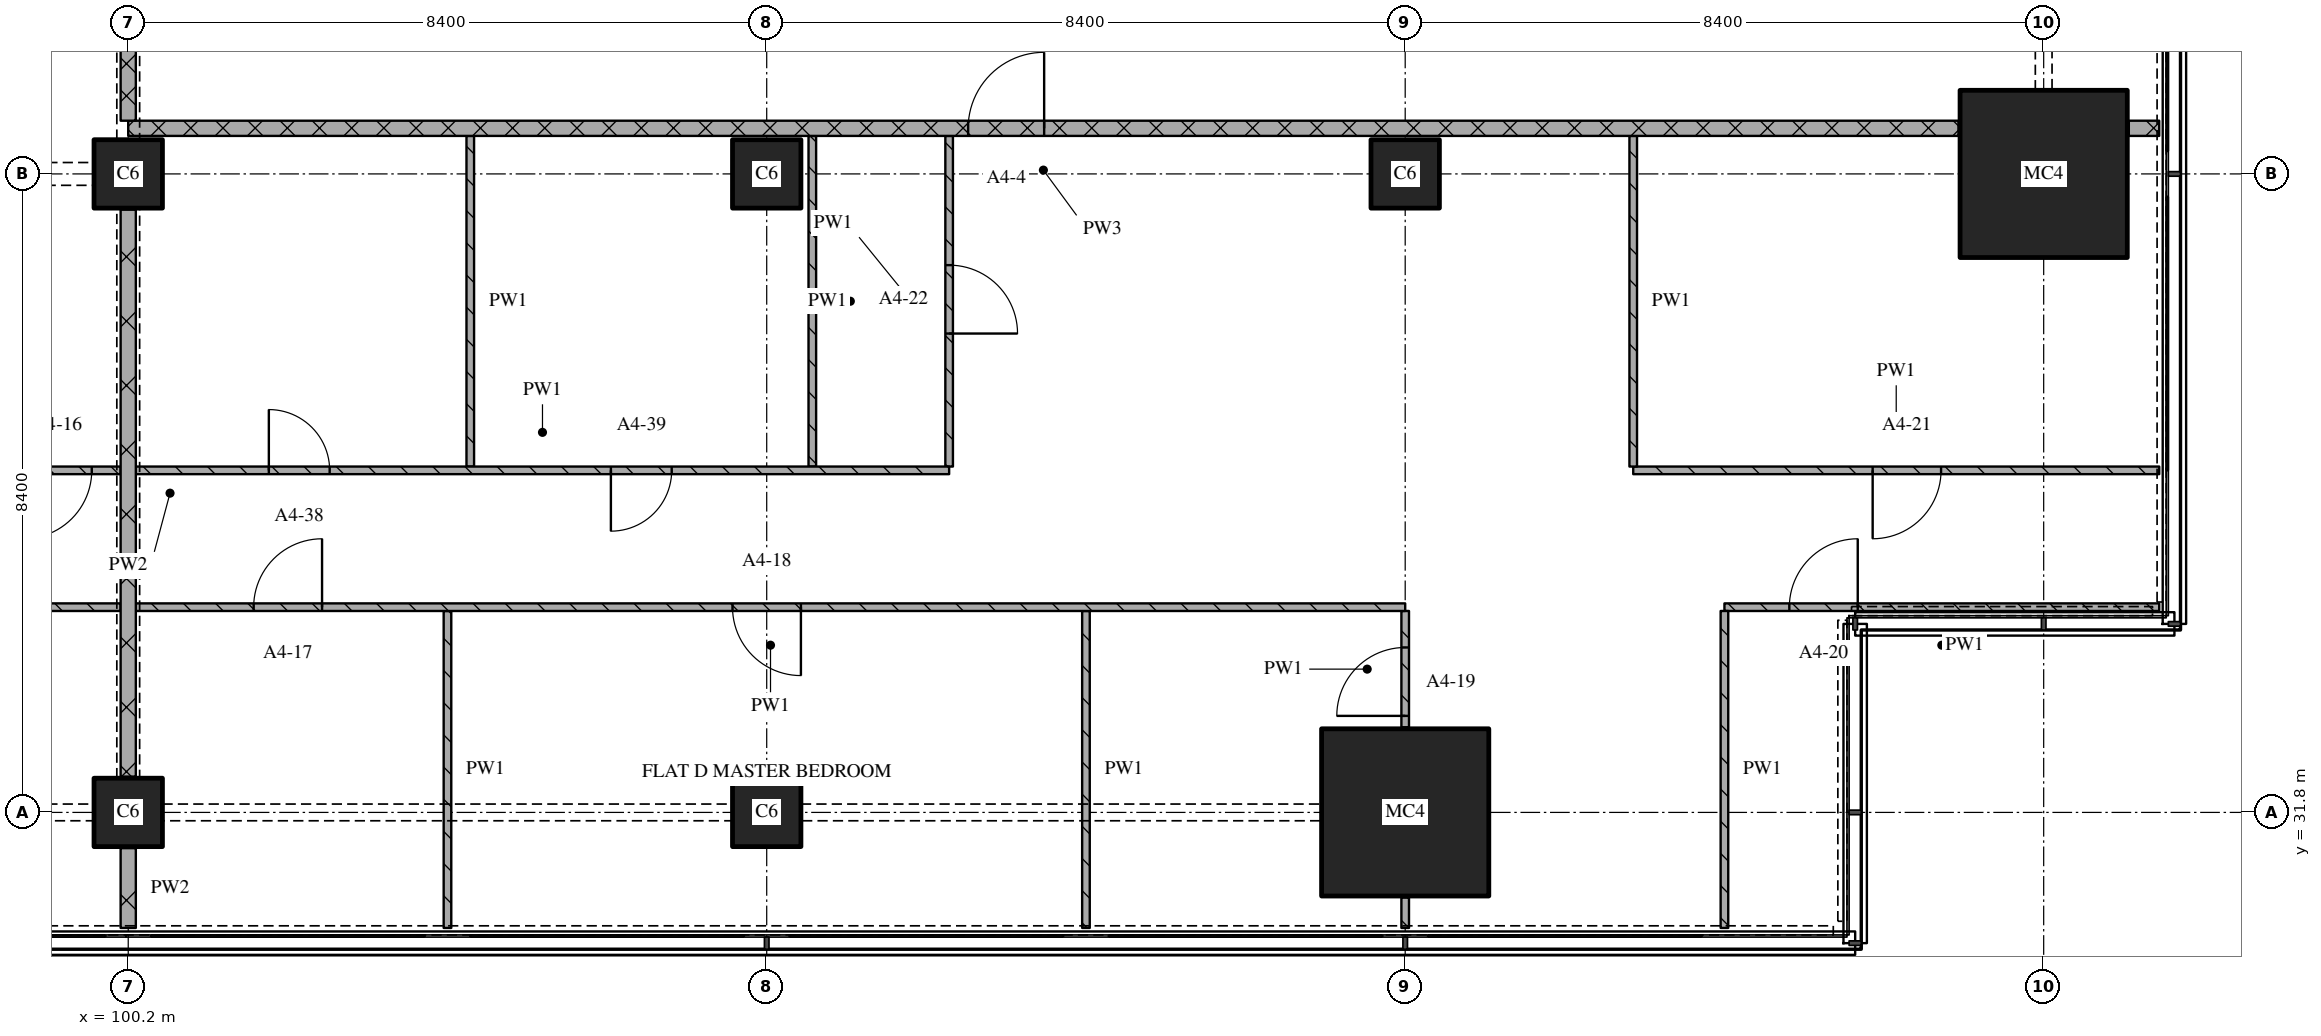
"""IFC4 building model, lengths in metres.
Left out: names, types, materials, properties, quantities, classifications, styles, units other than length and angle.
Written with IfcOpenShell. Run it as: python <this file> out.ifc"""

import sys

from ifc_helpers import new_model, si_unit, direction, frame, frame_2d, origin, origin_2d, place, context, subcontext, project, spatial, rectangle, extrude, element, fill, save


model = new_model("IFC4")
c1 = context("Model", 3, precision=1e-05, world=origin(), true_north=direction((0.0, 1.0)))
c2 = subcontext(c1, "Body", "Model", "MODEL_VIEW")
j1 = project(units=[si_unit("LENGTHUNIT", "METRE"), si_unit("PLANEANGLEUNIT", "RADIAN")], contexts=[c1])
p1 = place(None, origin())
s1 = spatial("IfcSite", under=j1, at=p1, CompositionType="ELEMENT")
p2 = place(p1, origin())
s2 = spatial("IfcBuilding", under=s1, at=p2, CompositionType="ELEMENT")
p3 = place(p2, frame((0.0, 0.0, 76.8)))
s3 = spatial("IfcBuildingStorey", under=s2, at=p3, CompositionType="ELEMENT", Elevation=76.8)
for number, where, z_axis, x_axis in (
    (1, (100.2, 31.8, 0.0), (0.0, 0.0, 1.0), (1.0, 0.0, 0.0)),
    (2, (100.2, 40.2, 0.0), (0.0, 0.0, 1.0), (1.0, 0.0, 0.0)),
    (3, (108.6, 31.8, 0.0), (0.0, 0.0, 1.0), (1.0, 0.0, 0.0)),
    (4, (108.6, 40.2, 0.0), (0.0, 0.0, 1.0), (1.0, 0.0, 0.0)),
):
    element("IfcColumn", number, at=place(p3, frame(where, z_axis=z_axis, x_axis=x_axis)), inside=s3, PredefinedType="COLUMN", context=c2, shape_type="SweptSolid", body=[
        extrude(rectangle(XDim=0.9, YDim=0.9, at=origin_2d()), origin(), (0.0, 0.0, 1.0), 3.6),
    ])
p4 = place(p3, frame((117.0, 31.8, 0.0), z_axis=(0.0, 0.0, 1.0), x_axis=(1.0, 0.0, 0.0)))
e5 = element("IfcColumn", 5, at=p4, inside=s3, PredefinedType="COLUMN", context=c2, shape_type="SweptSolid", body=[
    extrude(rectangle(XDim=2.2, YDim=2.2, at=origin_2d()), origin(), (0.0, 0.0, 1.0), 3.6),
])
p5 = place(p3, frame((117.0, 40.2, 0.0), z_axis=(0.0, 0.0, 1.0), x_axis=(1.0, 0.0, 0.0)))
e6 = element("IfcColumn", 6, at=p5, inside=s3, PredefinedType="COLUMN", context=c2, shape_type="SweptSolid", body=[
    extrude(rectangle(XDim=0.9, YDim=0.9, at=origin_2d()), origin(), (0.0, 0.0, 1.0), 3.6),
])
p6 = place(p3, frame((125.4, 40.2, 0.0), z_axis=(0.0, 0.0, 1.0), x_axis=(1.0, 0.0, 0.0)))
e7 = element("IfcColumn", 7, at=p6, inside=s3, PredefinedType="COLUMN", context=c2, shape_type="SweptSolid", body=[
    extrude(rectangle(XDim=2.2, YDim=2.2, at=origin_2d()), origin(), (0.0, 0.0, 1.0), 3.6),
])
p7 = place(p3, frame((126.92, 34.5, 0.0), z_axis=(0.0, 0.0, 1.0), x_axis=(-1.0, 0.0, 0.0)))
e8 = element("IfcWall", 8, at=p7, inside=s3, PredefinedType="PARTITIONING", context=c2, shape_type="SweptSolid", body=[
    extrude(rectangle(XDim=5.72, YDim=0.1, at=frame_2d((2.86, 0.0))), origin(), (0.0, 0.0, 1.0), 3.32),
])
p8 = place(p7, frame((3.966, 0.0, 0.0)))
e9 = element("IfcOpeningElement", 9, at=p8, cuts=e8, PredefinedType="OPENING", context=c2, shape_type="SweptSolid", body=[
    extrude(rectangle(XDim=0.9, YDim=2.1, at=frame_2d((0.45, 1.05))), frame((0.0, 0.06, 0.0), z_axis=(0.0, -1.0, 0.0), x_axis=(1.0, 0.0, 0.0)), (0.0, 0.0, 1.0), 0.12),
])
p9 = place(p3, frame((120.0, 36.3, 0.0), z_axis=(0.0, 0.0, 1.0), x_axis=(1.0, 0.0, 0.0)))
e10 = element("IfcWall", 10, at=p9, inside=s3, PredefinedType="PARTITIONING", context=c2, shape_type="SweptSolid", body=[
    extrude(rectangle(XDim=6.92, YDim=0.1, at=frame_2d((3.46, 0.0))), origin(), (0.0, 0.0, 1.0), 3.32),
])
p10 = place(p9, frame((3.15, 0.0, 0.0)))
e11 = element("IfcOpeningElement", 11, at=p10, cuts=e10, PredefinedType="OPENING", context=c2, shape_type="SweptSolid", body=[
    extrude(rectangle(XDim=0.9, YDim=2.1, at=frame_2d((0.45, 1.05))), frame((0.0, 0.06, 0.0), z_axis=(0.0, -1.0, 0.0), x_axis=(1.0, 0.0, 0.0)), (0.0, 0.0, 1.0), 0.12),
])
p11 = place(p3, frame((124.28, 40.8, 0.0), z_axis=(0.0, 0.0, 1.0), x_axis=(-1.0, 0.0, 0.0)))
e12 = element("IfcWall", 12, at=p11, inside=s3, PredefinedType="PARTITIONING", context=c2, shape_type="SweptSolid", body=[
    extrude(rectangle(XDim=24.08, YDim=0.2, at=frame_2d((12.04, 0.0))), origin(), (0.0, 0.0, 1.0), 3.32),
])
p12 = place(p11, frame((12.03, 0.0, 0.0)))
e13 = element("IfcOpeningElement", 13, at=p12, cuts=e12, PredefinedType="OPENING", context=c2, shape_type="SweptSolid", body=[
    extrude(rectangle(XDim=1.0, YDim=2.1, at=frame_2d((0.5, 1.05))), frame((0.0, 0.11, 0.0), z_axis=(0.0, -1.0, 0.0), x_axis=(1.0, 0.0, 0.0)), (0.0, 0.0, 1.0), 0.22),
])
p13 = place(p3, frame((126.52, 40.8, 0.0), z_axis=(0.0, 0.0, 1.0), x_axis=(1.0, 0.0, 0.0)))
e14 = element("IfcWall", 14, at=p13, inside=s3, PredefinedType="PARTITIONING", context=c2, shape_type="SweptSolid", body=[
    extrude(rectangle(XDim=0.4, YDim=0.2, at=frame_2d((0.2, 0.0))), origin(), (0.0, 0.0, 1.0), 3.32),
])
p14 = place(p3, frame((100.2, 43.1, 0.0), z_axis=(0.0, 0.0, 1.0), x_axis=(0.0, -1.0, 0.0)))
e15 = element("IfcWall", 15, at=p14, inside=s3, PredefinedType="PARTITIONING", context=c2, shape_type="SweptSolid", body=[
    extrude(rectangle(XDim=2.2, YDim=0.2, at=frame_2d((1.1, 0.0))), origin(), (0.0, 0.0, 1.0), 2.43),
])
p15 = place(p3, frame((100.2, 31.33, 0.0), z_axis=(0.0, 0.0, 1.0), x_axis=(0.0, -1.0, 0.0)))
e16 = element("IfcWall", 16, at=p15, inside=s3, PredefinedType="PARTITIONING", context=c2, shape_type="SweptSolid", body=[
    extrude(rectangle(XDim=1.05, YDim=0.2, at=frame_2d((0.525, 0.0))), origin(), (0.0, 0.0, 1.0), 3.32),
])
p16 = place(p3, frame((100.2, 39.73, 0.0), z_axis=(0.0, 0.0, 1.0), x_axis=(0.0, -1.0, 0.0)))
e17 = element("IfcWall", 17, at=p16, inside=s3, PredefinedType="PARTITIONING", context=c2, shape_type="SweptSolid", body=[
    extrude(rectangle(XDim=7.46, YDim=0.2, at=frame_2d((3.73, 0.0))), origin(), (0.0, 0.0, 1.0), 2.83),
])
p17 = place(p3, frame((104.4, 34.45, 0.0), z_axis=(0.0, 0.0, 1.0), x_axis=(0.0, -1.0, 0.0)))
e18 = element("IfcWall", 18, at=p17, inside=s3, PredefinedType="PARTITIONING", context=c2, shape_type="SweptSolid", body=[
    extrude(rectangle(XDim=4.17, YDim=0.1, at=frame_2d((2.085, 0.0))), origin(), (0.0, 0.0, 1.0), 3.32),
])
for number, where, z_axis, x_axis in (
    (19, (104.7, 40.7, 0.0), (0.0, 0.0, 1.0), (0.0, -1.0, 0.0)),
    (20, (109.2, 40.7, 0.0), (0.0, 0.0, 1.0), (0.0, -1.0, 0.0)),
):
    element("IfcWall", number, at=place(p3, frame(where, z_axis=z_axis, x_axis=x_axis)), inside=s3, PredefinedType="PARTITIONING", context=c2, shape_type="SweptSolid", body=[
        extrude(rectangle(XDim=4.35, YDim=0.1, at=frame_2d((2.175, 0.0))), origin(), (0.0, 0.0, 1.0), 3.32),
    ])
p18 = place(p3, frame((111.0, 36.35, 0.0), z_axis=(0.0, 0.0, 1.0), x_axis=(0.0, 1.0, 0.0)))
e21 = element("IfcWall", 21, at=p18, inside=s3, PredefinedType="PARTITIONING", context=c2, shape_type="SweptSolid", body=[
    extrude(rectangle(XDim=4.35, YDim=0.1, at=frame_2d((2.175, 0.0))), origin(), (0.0, 0.0, 1.0), 3.32),
])
p19 = place(p18, frame((1.75, 0.0, 0.0)))
e22 = element("IfcOpeningElement", 22, at=p19, cuts=e21, PredefinedType="OPENING", context=c2, shape_type="SweptSolid", body=[
    extrude(rectangle(XDim=0.9, YDim=2.1, at=frame_2d((0.45, 1.05))), frame((0.0, 0.06, 0.0), z_axis=(0.0, -1.0, 0.0), x_axis=(1.0, 0.0, 0.0)), (0.0, 0.0, 1.0), 0.12),
])
p20 = place(p3, frame((112.8, 34.45, 0.0), z_axis=(0.0, 0.0, 1.0), x_axis=(0.0, -1.0, 0.0)))
e23 = element("IfcWall", 23, at=p20, inside=s3, PredefinedType="PARTITIONING", context=c2, shape_type="SweptSolid", body=[
    extrude(rectangle(XDim=4.17, YDim=0.1, at=frame_2d((2.085, 0.0))), origin(), (0.0, 0.0, 1.0), 3.32),
])
p21 = place(p3, frame((117.0, 30.68, 0.0), z_axis=(0.0, 0.0, 1.0), x_axis=(0.0, -1.0, 0.0)))
e24 = element("IfcWall", 24, at=p21, inside=s3, PredefinedType="PARTITIONING", context=c2, shape_type="SweptSolid", body=[
    extrude(rectangle(XDim=0.4, YDim=0.1, at=frame_2d((0.2, 0.0))), origin(), (0.0, 0.0, 1.0), 3.32),
])
p22 = place(p3, frame((117.0, 32.92, 0.0), z_axis=(0.0, 0.0, 1.0), x_axis=(0.0, 1.0, 0.0)))
e25 = element("IfcWall", 25, at=p22, inside=s3, PredefinedType="PARTITIONING", context=c2, shape_type="SweptSolid", body=[
    extrude(rectangle(XDim=1.53, YDim=0.1, at=frame_2d((0.765, 0.0))), origin(), (0.0, 0.0, 1.0), 3.32),
])
p23 = place(p22, frame((0.15, 0.0, 0.0)))
e26 = element("IfcOpeningElement", 26, at=p23, cuts=e25, PredefinedType="OPENING", context=c2, shape_type="SweptSolid", body=[
    extrude(rectangle(XDim=0.9, YDim=2.1, at=frame_2d((0.45, 1.05))), frame((0.0, 0.06, 0.0), z_axis=(0.0, -1.0, 0.0), x_axis=(1.0, 0.0, 0.0)), (0.0, 0.0, 1.0), 0.12),
])
p24 = place(p3, frame((120.0, 40.7, 0.0), z_axis=(0.0, 0.0, 1.0), x_axis=(0.0, -1.0, 0.0)))
e27 = element("IfcWall", 27, at=p24, inside=s3, PredefinedType="PARTITIONING", context=c2, shape_type="SweptSolid", body=[
    extrude(rectangle(XDim=4.35, YDim=0.1, at=frame_2d((2.175, 0.0))), origin(), (0.0, 0.0, 1.0), 3.32),
])
p25 = place(p3, frame((121.2, 34.45, 0.0), z_axis=(0.0, 0.0, 1.0), x_axis=(0.0, -1.0, 0.0)))
e28 = element("IfcWall", 28, at=p25, inside=s3, PredefinedType="PARTITIONING", context=c2, shape_type="SweptSolid", body=[
    extrude(rectangle(XDim=4.17, YDim=0.1, at=frame_2d((2.085, 0.0))), origin(), (0.0, 0.0, 1.0), 3.32),
])
p26 = place(p3, frame((100.1, 34.5, 0.0), z_axis=(0.0, 0.0, 1.0), x_axis=(-1.0, 0.0, 0.0)))
e29 = element("IfcWall", 29, at=p26, inside=s3, PredefinedType="PARTITIONING", context=c2, shape_type="SweptSolid", body=[
    extrude(rectangle(XDim=8.3, YDim=0.1, at=frame_2d((4.15, 0.0))), origin(), (0.0, 0.0, 1.0), 3.32),
])
p27 = place(p26, frame((3.65, 0.0, 0.0)))
e30 = element("IfcOpeningElement", 30, at=p27, cuts=e29, PredefinedType="OPENING", context=c2, shape_type="SweptSolid", body=[
    extrude(rectangle(XDim=0.9, YDim=2.1, at=frame_2d((0.45, 1.05))), frame((0.0, 0.06, 0.0), z_axis=(0.0, -1.0, 0.0), x_axis=(1.0, 0.0, 0.0)), (0.0, 0.0, 1.0), 0.12),
])
p28 = place(p3, frame((117.0, 34.5, 0.0), z_axis=(0.0, 0.0, 1.0), x_axis=(-1.0, 0.0, 0.0)))
e31 = element("IfcWall", 31, at=p28, inside=s3, PredefinedType="PARTITIONING", context=c2, shape_type="SweptSolid", body=[
    extrude(rectangle(XDim=16.7, YDim=0.1, at=frame_2d((8.35, 0.0))), origin(), (0.0, 0.0, 1.0), 3.32),
])
p29 = place(p28, frame((7.95, 0.0, 0.0)))
e32 = element("IfcOpeningElement", 32, at=p29, cuts=e31, PredefinedType="OPENING", context=c2, shape_type="SweptSolid", body=[
    extrude(rectangle(XDim=0.9, YDim=2.1, at=frame_2d((0.45, 1.05))), frame((0.0, 0.06, 0.0), z_axis=(0.0, -1.0, 0.0), x_axis=(1.0, 0.0, 0.0)), (0.0, 0.0, 1.0), 0.12),
])
p30 = place(p28, frame((14.25, 0.0, 0.0)))
e33 = element("IfcOpeningElement", 33, at=p30, cuts=e31, PredefinedType="OPENING", context=c2, shape_type="SweptSolid", body=[
    extrude(rectangle(XDim=0.9, YDim=2.1, at=frame_2d((0.45, 1.05))), frame((0.0, 0.06, 0.0), z_axis=(0.0, -1.0, 0.0), x_axis=(1.0, 0.0, 0.0)), (0.0, 0.0, 1.0), 0.12),
])
p31 = place(p3, frame((94.5, 36.3, 0.0), z_axis=(0.0, 0.0, 1.0), x_axis=(1.0, 0.0, 0.0)))
e34 = element("IfcWall", 34, at=p31, inside=s3, PredefinedType="PARTITIONING", context=c2, shape_type="SweptSolid", body=[
    extrude(rectangle(XDim=5.6, YDim=0.1, at=frame_2d((2.8, 0.0))), origin(), (0.0, 0.0, 1.0), 3.32),
])
p32 = place(p31, frame((4.32, 0.0, 0.0)))
e35 = element("IfcOpeningElement", 35, at=p32, cuts=e34, PredefinedType="OPENING", context=c2, shape_type="SweptSolid", body=[
    extrude(rectangle(XDim=0.9, YDim=2.1, at=frame_2d((0.45, 1.05))), frame((0.0, 0.06, 0.0), z_axis=(0.0, -1.0, 0.0), x_axis=(1.0, 0.0, 0.0)), (0.0, 0.0, 1.0), 0.12),
])
p33 = place(p3, frame((100.3, 36.3, 0.0), z_axis=(0.0, 0.0, 1.0), x_axis=(1.0, 0.0, 0.0)))
e36 = element("IfcWall", 36, at=p33, inside=s3, PredefinedType="PARTITIONING", context=c2, shape_type="SweptSolid", body=[
    extrude(rectangle(XDim=10.7, YDim=0.1, at=frame_2d((5.35, 0.0))), origin(), (0.0, 0.0, 1.0), 3.32),
])
p34 = place(p33, frame((1.75, 0.0, 0.0)))
e37 = element("IfcOpeningElement", 37, at=p34, cuts=e36, PredefinedType="OPENING", context=c2, shape_type="SweptSolid", body=[
    extrude(rectangle(XDim=0.8, YDim=2.1, at=frame_2d((0.4, 1.05))), frame((0.0, 0.06, 0.0), z_axis=(0.0, -1.0, 0.0), x_axis=(1.0, 0.0, 0.0)), (0.0, 0.0, 1.0), 0.12),
])
p35 = place(p33, frame((6.25, 0.0, 0.0)))
e38 = element("IfcOpeningElement", 38, at=p35, cuts=e36, PredefinedType="OPENING", context=c2, shape_type="SweptSolid", body=[
    extrude(rectangle(XDim=0.8, YDim=2.1, at=frame_2d((0.4, 1.05))), frame((0.0, 0.06, 0.0), z_axis=(0.0, -1.0, 0.0), x_axis=(1.0, 0.0, 0.0)), (0.0, 0.0, 1.0), 0.12),
])
p36 = place(p8, origin())
e39 = element("IfcDoor", 39, at=p36, inside=s3, OperationType="SINGLE_SWING_RIGHT", PredefinedType="DOOR", context=c2, shape_type="SweptSolid", body=[
    extrude(rectangle(XDim=0.9, YDim=2.1, at=frame_2d((0.45, 1.05))), frame((0.0, 0.025, 0.0), z_axis=(0.0, -1.0, 0.0), x_axis=(1.0, 0.0, 0.0)), (0.0, 0.0, 1.0), 0.05),
])
fill(e9, e39)
p37 = place(p10, origin())
e40 = element("IfcDoor", 40, at=p37, inside=s3, OperationType="SINGLE_SWING_RIGHT", PredefinedType="DOOR", context=c2, shape_type="SweptSolid", body=[
    extrude(rectangle(XDim=0.9, YDim=2.1, at=frame_2d((0.45, 1.05))), frame((0.0, 0.025, 0.0), z_axis=(0.0, -1.0, 0.0), x_axis=(1.0, 0.0, 0.0)), (0.0, 0.0, 1.0), 0.05),
])
fill(e11, e40)
p38 = place(p12, origin())
e41 = element("IfcDoor", 41, at=p38, inside=s3, OperationType="SINGLE_SWING_RIGHT", PredefinedType="DOOR", context=c2, shape_type="SweptSolid", body=[
    extrude(rectangle(XDim=1.0, YDim=2.1, at=frame_2d((0.5, 1.05))), frame((0.0, 0.025, 0.0), z_axis=(0.0, -1.0, 0.0), x_axis=(1.0, 0.0, 0.0)), (0.0, 0.0, 1.0), 0.05),
])
fill(e13, e41)
p39 = place(p19, origin())
e42 = element("IfcDoor", 42, at=p39, inside=s3, OperationType="SINGLE_SWING_RIGHT", PredefinedType="DOOR", context=c2, shape_type="SweptSolid", body=[
    extrude(rectangle(XDim=0.9, YDim=2.1, at=frame_2d((0.45, 1.05))), frame((0.0, 0.025, 0.0), z_axis=(0.0, -1.0, 0.0), x_axis=(1.0, 0.0, 0.0)), (0.0, 0.0, 1.0), 0.05),
])
fill(e22, e42)
p40 = place(p23, origin())
e43 = element("IfcDoor", 43, at=p40, inside=s3, OperationType="SINGLE_SWING_LEFT", PredefinedType="DOOR", context=c2, shape_type="SweptSolid", body=[
    extrude(rectangle(XDim=0.9, YDim=2.1, at=frame_2d((0.45, 1.05))), frame((0.0, 0.025, 0.0), z_axis=(0.0, -1.0, 0.0), x_axis=(1.0, 0.0, 0.0)), (0.0, 0.0, 1.0), 0.05),
])
fill(e26, e43)
p41 = place(p29, origin())
e44 = element("IfcDoor", 44, at=p41, inside=s3, OperationType="SINGLE_SWING_LEFT", PredefinedType="DOOR", context=c2, shape_type="SweptSolid", body=[
    extrude(rectangle(XDim=0.9, YDim=2.1, at=frame_2d((0.45, 1.05))), frame((0.0, 0.025, 0.0), z_axis=(0.0, -1.0, 0.0), x_axis=(1.0, 0.0, 0.0)), (0.0, 0.0, 1.0), 0.05),
])
fill(e32, e44)
p42 = place(p30, origin())
e45 = element("IfcDoor", 45, at=p42, inside=s3, OperationType="SINGLE_SWING_RIGHT", PredefinedType="DOOR", context=c2, shape_type="SweptSolid", body=[
    extrude(rectangle(XDim=0.9, YDim=2.1, at=frame_2d((0.45, 1.05))), frame((0.0, 0.025, 0.0), z_axis=(0.0, -1.0, 0.0), x_axis=(1.0, 0.0, 0.0)), (0.0, 0.0, 1.0), 0.05),
])
fill(e33, e45)
p43 = place(p32, origin())
e46 = element("IfcDoor", 46, at=p43, inside=s3, OperationType="SINGLE_SWING_RIGHT", PredefinedType="DOOR", context=c2, shape_type="SweptSolid", body=[
    extrude(rectangle(XDim=0.9, YDim=2.1, at=frame_2d((0.45, 1.05))), frame((0.0, 0.025, 0.0), z_axis=(0.0, -1.0, 0.0), x_axis=(1.0, 0.0, 0.0)), (0.0, 0.0, 1.0), 0.05),
])
fill(e35, e46)
p44 = place(p34, origin())
e47 = element("IfcDoor", 47, at=p44, inside=s3, OperationType="SINGLE_SWING_LEFT", PredefinedType="DOOR", context=c2, shape_type="SweptSolid", body=[
    extrude(rectangle(XDim=0.8, YDim=2.1, at=frame_2d((0.4, 1.05))), frame((0.0, 0.025, 0.0), z_axis=(0.0, -1.0, 0.0), x_axis=(1.0, 0.0, 0.0)), (0.0, 0.0, 1.0), 0.05),
])
fill(e37, e47)
p45 = place(p35, origin())
e48 = element("IfcDoor", 48, at=p45, inside=s3, OperationType="SINGLE_SWING_RIGHT", PredefinedType="DOOR", context=c2, shape_type="SweptSolid", body=[
    extrude(rectangle(XDim=0.8, YDim=2.1, at=frame_2d((0.4, 1.05))), frame((0.0, 0.025, 0.0), z_axis=(0.0, -1.0, 0.0), x_axis=(1.0, 0.0, 0.0)), (0.0, 0.0, 1.0), 0.05),
])
fill(e38, e48)
save(model, sys.argv[1])
